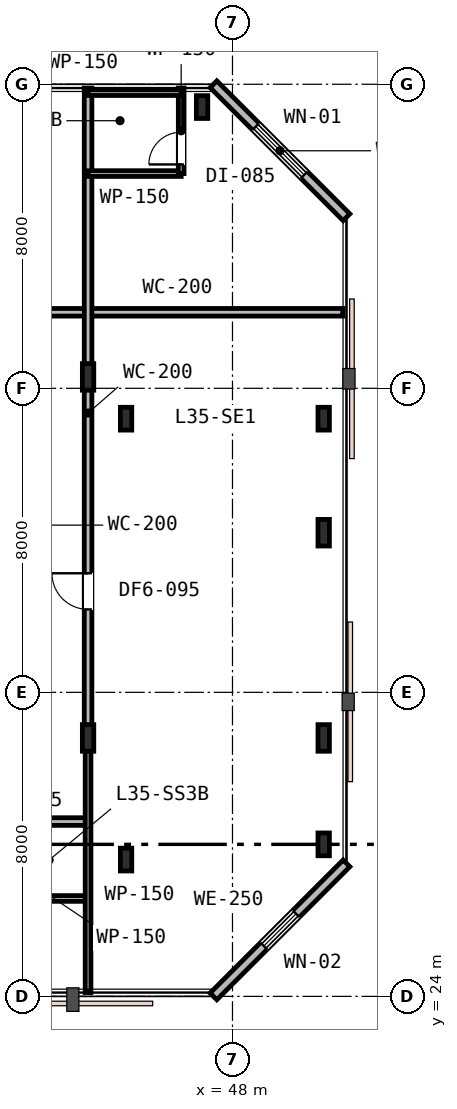
"""IFC4 building model, lengths in metres.
Left out: names, types, materials, properties, quantities, classifications, styles, units other than length and angle.
Written with IfcOpenShell. Run it as: python <this file> out.ifc"""

import sys

from ifc_helpers import new_model, si_unit, direction, frame, frame_2d, origin, origin_2d, place, context, subcontext, project, spatial, rectangle, i_section, extrude, element, fill, save


model = new_model("IFC4")
c1 = context("Model", 3, precision=1e-05, world=origin(), true_north=direction((0.0, 1.0)))
c2 = subcontext(c1, "Body", "Model", "MODEL_VIEW")
j1 = project(units=[si_unit("LENGTHUNIT", "METRE"), si_unit("PLANEANGLEUNIT", "RADIAN")], contexts=[c1])
p1 = place(None, origin())
s1 = spatial("IfcSite", under=j1, at=p1, CompositionType="ELEMENT")
p2 = place(p1, origin())
s2 = spatial("IfcBuilding", under=s1, at=p2, CompositionType="ELEMENT")
p3 = place(p2, frame((0.0, 0.0, 136.8)))
s3 = spatial("IfcBuildingStorey", under=s2, at=p3, CompositionType="ELEMENT", Elevation=136.8)
for number, where, z_axis, x_axis in (
    (1, (45.2, 27.6, 0.0), (0.0, 0.0, 1.0), (1.0, 0.0, 0.0)),
    (2, (45.2, 39.2, 0.0), (0.0, 0.0, 1.0), (1.0, 0.0, 0.0)),
    (3, (47.2, 47.4, 0.0), (0.0, 0.0, 1.0), (1.0, 0.0, 0.0)),
    (4, (50.4, 28.0, 0.0), (0.0, 0.0, 1.0), (1.0, 0.0, 0.0)),
    (5, (50.4, 39.2, 0.0), (0.0, 0.0, 1.0), (1.0, 0.0, 0.0)),
):
    element("IfcColumn", number, at=place(p3, frame(where, z_axis=z_axis, x_axis=x_axis)), inside=s3, PredefinedType="COLUMN", context=c2, shape_type="SweptSolid", body=[
        extrude(i_section(OverallWidth=0.3, OverallDepth=0.6, WebThickness=0.015, FlangeThickness=0.03, FilletRadius=0.027, at=origin_2d()), origin(), (0.0, 0.0, 1.0), 3.6),
    ])
for number, where, z_axis, x_axis in (
    (6, (44.2, 30.8, 0.0), (0.0, 0.0, 1.0), (1.0, 0.0, 0.0)),
    (7, (44.2, 40.3, 0.0), (0.0, 0.0, 1.0), (1.0, 0.0, 0.0)),
    (8, (50.4, 30.8, 0.0), (0.0, 0.0, 1.0), (1.0, 0.0, 0.0)),
    (9, (50.4, 36.2, 0.0), (0.0, 0.0, 1.0), (1.0, 0.0, 0.0)),
):
    element("IfcColumn", number, at=place(p3, frame(where, z_axis=z_axis, x_axis=x_axis)), inside=s3, PredefinedType="COLUMN", context=c2, shape_type="SweptSolid", body=[
        extrude(i_section(OverallWidth=0.3, OverallDepth=0.7, WebThickness=0.017, FlangeThickness=0.032, FilletRadius=0.027, at=origin_2d()), origin(), (0.0, 0.0, 1.0), 3.6),
    ])
p4 = place(p3, frame((47.5, 24.0, 0.0), z_axis=(0.0, 0.0, 1.0), x_axis=(0.707106781187, 0.707106781187, 0.0)))
e10 = element("IfcWall", 10, at=p4, inside=s3, PredefinedType="STANDARD", context=c2, shape_type="SweptSolid", body=[
    extrude(rectangle(XDim=4.95, YDim=0.25, at=frame_2d((2.475, 0.0))), origin(), (0.0, 0.0, 1.0), 3.33),
])
p5 = place(p4, frame((1.875, 0.0, 0.85)))
e11 = element("IfcOpeningElement", 11, at=p5, cuts=e10, PredefinedType="OPENING", context=c2, shape_type="SweptSolid", body=[
    extrude(rectangle(XDim=1.2, YDim=1.6, at=frame_2d((0.6, 0.8))), frame((0.0, 0.135, 0.0), z_axis=(0.0, -1.0, 0.0), x_axis=(1.0, 0.0, 0.0)), (0.0, 0.0, 1.0), 0.27),
])
p6 = place(p3, frame((51.0, 44.5, 0.0), z_axis=(0.0, 0.0, 1.0), x_axis=(-0.707106781187, 0.707106781187, 0.0)))
e12 = element("IfcWall", 12, at=p6, inside=s3, PredefinedType="STANDARD", context=c2, shape_type="SweptSolid", body=[
    extrude(rectangle(XDim=4.95, YDim=0.25, at=frame_2d((2.475, 0.0))), origin(), (0.0, 0.0, 1.0), 3.33),
])
p7 = place(p6, frame((1.575, 0.0, 0.75)))
e13 = element("IfcOpeningElement", 13, at=p7, cuts=e12, PredefinedType="OPENING", context=c2, shape_type="SweptSolid", body=[
    extrude(rectangle(XDim=1.8, YDim=1.85, at=frame_2d((0.9, 0.925))), frame((0.0, 0.135, 0.0), z_axis=(0.0, -1.0, 0.0), x_axis=(1.0, 0.0, 0.0)), (0.0, 0.0, 1.0), 0.27),
])
p8 = place(p3, frame((19.0, 28.6, 0.0), z_axis=(0.0, 0.0, 1.0), x_axis=(1.0, 0.0, 0.0)))
e14 = element("IfcWall", 14, at=p8, inside=s3, PredefinedType="PARTITIONING", context=c2, shape_type="SweptSolid", body=[
    extrude(rectangle(XDim=25.2, YDim=0.2, at=frame_2d((12.6, 0.0))), origin(), (0.0, 0.0, 1.0), 2.93),
])
p9 = place(p8, frame((6.561, 0.0, 0.0)))
e15 = element("IfcOpeningElement", 15, at=p9, cuts=e14, PredefinedType="OPENING", context=c2, shape_type="SweptSolid", body=[
    extrude(rectangle(XDim=0.95, YDim=2.15, at=frame_2d((0.475, 1.075))), frame((0.0, 0.11, 0.0), z_axis=(0.0, -1.0, 0.0), x_axis=(1.0, 0.0, 0.0)), (0.0, 0.0, 1.0), 0.22),
])
p10 = place(p8, frame((13.332, 0.0, 0.0)))
e16 = element("IfcOpeningElement", 16, at=p10, cuts=e14, PredefinedType="OPENING", context=c2, shape_type="SweptSolid", body=[
    extrude(rectangle(XDim=0.95, YDim=2.15, at=frame_2d((0.475, 1.075))), frame((0.0, 0.11, 0.0), z_axis=(0.0, -1.0, 0.0), x_axis=(1.0, 0.0, 0.0)), (0.0, 0.0, 1.0), 0.22),
])
p11 = place(p8, frame((20.032, 0.0, 0.0)))
e17 = element("IfcOpeningElement", 17, at=p11, cuts=e14, PredefinedType="OPENING", context=c2, shape_type="SweptSolid", body=[
    extrude(rectangle(XDim=0.95, YDim=2.15, at=frame_2d((0.475, 1.075))), frame((0.0, 0.11, 0.0), z_axis=(0.0, -1.0, 0.0), x_axis=(1.0, 0.0, 0.0)), (0.0, 0.0, 1.0), 0.22),
])
p12 = place(p3, frame((42.2, 42.0, 0.0), z_axis=(0.0, 0.0, 1.0), x_axis=(1.0, 0.0, 0.0)))
e18 = element("IfcWall", 18, at=p12, inside=s3, PredefinedType="PARTITIONING", context=c2, shape_type="SweptSolid", body=[
    extrude(rectangle(XDim=8.7, YDim=0.2, at=frame_2d((4.35, 0.0))), origin(), (0.0, 0.0, 1.0), 3.33),
])
p13 = place(p3, frame((41.788, 26.576, 0.0), z_axis=(0.0, 0.0, 1.0), x_axis=(1.0, 0.0, 0.0)))
e19 = element("IfcWall", 19, at=p13, inside=s3, PredefinedType="PARTITIONING", context=c2, shape_type="SweptSolid", body=[
    extrude(rectangle(XDim=2.412, YDim=0.15, at=frame_2d((1.206, 0.0))), origin(), (0.0, 0.0, 1.0), 3.33),
])
p14 = place(p3, frame((44.2, 30.8, 0.0), z_axis=(0.0, 0.0, 1.0), x_axis=(0.0, -1.0, 0.0)))
e20 = element("IfcWall", 20, at=p14, inside=s3, PredefinedType="PARTITIONING", context=c2, shape_type="SweptSolid", body=[
    extrude(rectangle(XDim=6.7, YDim=0.15, at=frame_2d((3.35, 0.0))), origin(), (0.0, 0.0, 1.0), 2.93),
])
p15 = place(p3, frame((44.2, 30.8, 0.0), z_axis=(0.0, 0.0, 1.0), x_axis=(0.0, 1.0, 0.0)))
e21 = element("IfcWall", 21, at=p15, inside=s3, PredefinedType="PARTITIONING", context=c2, shape_type="SweptSolid", body=[
    extrude(rectangle(XDim=17.1, YDim=0.2, at=frame_2d((8.55, 0.0))), origin(), (0.0, 0.0, 1.0), 2.93),
])
p16 = place(p15, frame((3.382, 0.0, 0.0)))
e22 = element("IfcOpeningElement", 22, at=p16, cuts=e21, PredefinedType="OPENING", context=c2, shape_type="SweptSolid", body=[
    extrude(rectangle(XDim=0.95, YDim=2.15, at=frame_2d((0.475, 1.075))), frame((0.0, 0.11, 0.0), z_axis=(0.0, -1.0, 0.0), x_axis=(1.0, 0.0, 0.0)), (0.0, 0.0, 1.0), 0.22),
])
p17 = place(p3, frame((44.2, 45.65, 0.0), z_axis=(0.0, 0.0, 1.0), x_axis=(1.0, 0.0, 0.0)))
e23 = element("IfcWall", 23, at=p17, inside=s3, PredefinedType="PARTITIONING", context=c2, shape_type="SweptSolid", body=[
    extrude(rectangle(XDim=2.45, YDim=0.15, at=frame_2d((1.225, 0.0))), origin(), (0.0, 0.0, 1.0), 3.33),
])
p18 = place(p3, frame((46.65, 45.65, 0.0), z_axis=(0.0, 0.0, 1.0), x_axis=(0.0, 1.0, 0.0)))
e24 = element("IfcWall", 24, at=p18, inside=s3, PredefinedType="PARTITIONING", context=c2, shape_type="SweptSolid", body=[
    extrude(rectangle(XDim=2.25, YDim=0.15, at=frame_2d((1.125, 0.0))), origin(), (0.0, 0.0, 1.0), 3.01),
])
p19 = place(p18, frame((0.24, 0.0, 0.0)))
e25 = element("IfcOpeningElement", 25, at=p19, cuts=e24, PredefinedType="OPENING", context=c2, shape_type="SweptSolid", body=[
    extrude(rectangle(XDim=0.85, YDim=2.15, at=frame_2d((0.425, 1.075))), frame((0.0, 0.085, 0.0), z_axis=(0.0, -1.0, 0.0), x_axis=(1.0, 0.0, 0.0)), (0.0, 0.0, 1.0), 0.17),
])
p20 = place(p3, frame((44.2, 47.78, 0.0), z_axis=(0.0, 0.0, 1.0), x_axis=(1.0, 0.0, 0.0)))
e26 = element("IfcWall", 26, at=p20, inside=s3, PredefinedType="PARTITIONING", context=c2, shape_type="SweptSolid", body=[
    extrude(rectangle(XDim=2.45, YDim=0.15, at=frame_2d((1.225, 0.0))), origin(), (0.0, 0.0, 1.0), 3.01),
])
p21 = place(p5, origin())
e27 = element("IfcWindow", 27, at=p21, inside=s3, PartitioningType="SINGLE_PANEL", PredefinedType="WINDOW", context=c2, shape_type="SweptSolid", body=[
    extrude(rectangle(XDim=1.2, YDim=1.6, at=frame_2d((0.6, 0.8))), frame((0.0, 0.03, 0.0), z_axis=(0.0, -1.0, 0.0), x_axis=(1.0, 0.0, 0.0)), (0.0, 0.0, 1.0), 0.06),
])
fill(e11, e27)
p22 = place(p7, origin())
e28 = element("IfcWindow", 28, at=p22, inside=s3, PartitioningType="SINGLE_PANEL", PredefinedType="WINDOW", context=c2, shape_type="SweptSolid", body=[
    extrude(rectangle(XDim=1.8, YDim=1.85, at=frame_2d((0.9, 0.925))), frame((0.0, 0.03, 0.0), z_axis=(0.0, -1.0, 0.0), x_axis=(1.0, 0.0, 0.0)), (0.0, 0.0, 1.0), 0.06),
])
fill(e13, e28)
p23 = place(p16, origin())
e29 = element("IfcDoor", 29, at=p23, inside=s3, OperationType="SINGLE_SWING_RIGHT", PredefinedType="DOOR", context=c2, shape_type="SweptSolid", body=[
    extrude(rectangle(XDim=0.95, YDim=2.15, at=frame_2d((0.475, 1.075))), frame((0.0, 0.025, 0.0), z_axis=(0.0, -1.0, 0.0), x_axis=(1.0, 0.0, 0.0)), (0.0, 0.0, 1.0), 0.05),
])
fill(e22, e29)
p24 = place(p19, origin())
e30 = element("IfcDoor", 30, at=p24, inside=s3, OperationType="SINGLE_SWING_LEFT", PredefinedType="DOOR", context=c2, shape_type="SweptSolid", body=[
    extrude(rectangle(XDim=0.85, YDim=2.15, at=frame_2d((0.425, 1.075))), frame((0.0, 0.025, 0.0), z_axis=(0.0, -1.0, 0.0), x_axis=(1.0, 0.0, 0.0)), (0.0, 0.0, 1.0), 0.05),
])
fill(e25, e30)
save(model, sys.argv[1])
